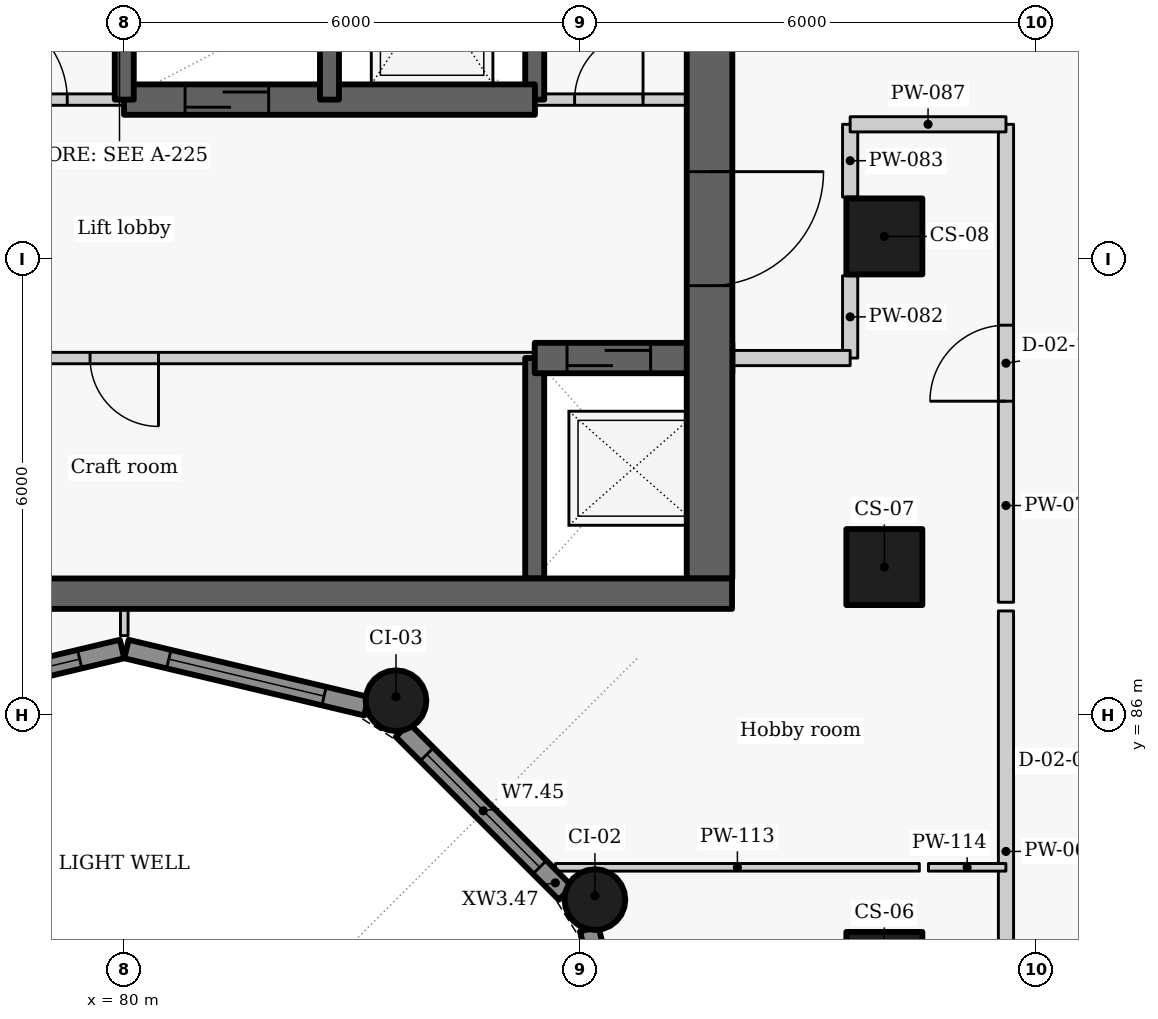
"""IFC4 building model, lengths in metres.
Left out: names, types, materials, properties, quantities, classifications, styles, units other than length and angle.
Written with IfcOpenShell. Run it as: python <this file> out.ifc"""

import sys

from ifc_helpers import new_model, si_unit, direction, frame, frame_2d, origin, origin_2d, place, context, subcontext, project, spatial, rectangle, circle, extrude, element, fill, save


model = new_model("IFC4")
c1 = context("Model", 3, precision=1e-05, world=origin(), true_north=direction((0.0, 1.0)))
c2 = subcontext(c1, "Body", "Model", "MODEL_VIEW")
j1 = project(units=[si_unit("LENGTHUNIT", "METRE"), si_unit("PLANEANGLEUNIT", "RADIAN")], contexts=[c1])
p1 = place(None, origin())
s1 = spatial("IfcSite", under=j1, at=p1, CompositionType="ELEMENT")
p2 = place(p1, origin())
s2 = spatial("IfcBuilding", under=s1, at=p2, CompositionType="ELEMENT")
p3 = place(p2, frame((0.0, 0.0, 130.5)))
s3 = spatial("IfcBuildingStorey", under=s2, at=p3, CompositionType="ELEMENT", Elevation=130.5)
for number, where, z_axis, x_axis in (
    (1, (90.0, 82.65, 0.0), (0.0, 0.0, 1.0), (0.0, 1.0, 0.0)),
    (2, (90.0, 87.95, 0.0), (0.0, 0.0, 1.0), (0.0, 1.0, 0.0)),
    (3, (90.0, 92.3, 0.0), (0.0, 0.0, 1.0), (0.0, 1.0, 0.0)),
):
    element("IfcColumn", number, at=place(p3, frame(where, z_axis=z_axis, x_axis=x_axis)), inside=s3, PredefinedType="COLUMN", context=c2, shape_type="SweptSolid", body=[
        extrude(rectangle(XDim=1.0, YDim=1.0, at=origin_2d()), origin(), (0.0, 0.0, 1.0), 3.3),
    ])
for number, where, z_axis, x_axis in (
    (4, (86.192, 83.575, 0.0), (0.0, 0.0, 1.0), (-0.5, 0.866, 0.0)),
    (5, (83.575, 86.192, 0.0), (0.0, 0.0, 1.0), (-0.866, 0.5, 0.0)),
):
    element("IfcColumn", number, at=place(p3, frame(where, z_axis=z_axis, x_axis=x_axis)), inside=s3, PredefinedType="COLUMN", context=c2, shape_type="SweptSolid", body=[
        extrude(circle(Radius=0.4, at=origin_2d()), origin(), (0.0, 0.0, 1.0), 3.3),
    ])
p4 = place(p3, frame((76.814, 86.119, 0.0), z_axis=(0.0, 0.0, 1.0), x_axis=(0.972773113459, 0.231759508395, 0.0)))
e6 = element("IfcWall", 6, at=p4, inside=s3, PredefinedType="SOLIDWALL", context=c2, shape_type="SweptSolid", body=[
    extrude(rectangle(XDim=3.246, YDim=0.25, at=frame_2d((1.623, 0.0))), origin(), (0.0, 0.0, 1.0), 2.425),
])
p5 = place(p4, frame((0.573, 0.0, 0.9)))
e7 = element("IfcOpeningElement", 7, at=p5, cuts=e6, PredefinedType="OPENING", context=c2, shape_type="SweptSolid", body=[
    extrude(rectangle(XDim=2.1, YDim=1.1, at=frame_2d((1.05, 0.55))), frame((0.0, 0.135, 0.0), z_axis=(0.0, -1.0, 0.0), x_axis=(1.0, 0.0, 0.0)), (0.0, 0.0, 1.0), 0.27),
])
p6 = place(p3, frame((80.029, 86.872, 0.0), z_axis=(0.0, 0.0, 1.0), x_axis=(0.972773113459, -0.231759508395, 0.0)))
e8 = element("IfcWall", 8, at=p6, inside=s3, PredefinedType="SOLIDWALL", context=c2, shape_type="SweptSolid", body=[
    extrude(rectangle(XDim=3.246, YDim=0.25, at=frame_2d((1.623, 0.0))), origin(), (0.0, 0.0, 1.0), 2.425),
])
p7 = place(p6, frame((0.573, 0.0, 0.9)))
e9 = element("IfcOpeningElement", 9, at=p7, cuts=e8, PredefinedType="OPENING", context=c2, shape_type="SweptSolid", body=[
    extrude(rectangle(XDim=2.1, YDim=1.1, at=frame_2d((1.05, 0.55))), frame((0.0, 0.135, 0.0), z_axis=(0.0, -1.0, 0.0), x_axis=(1.0, 0.0, 0.0)), (0.0, 0.0, 1.0), 0.27),
])
p8 = place(p3, frame((83.661, 85.806, 0.0), z_axis=(0.0, 0.0, 1.0), x_axis=(0.707106781187, -0.707106781187, 0.0)))
e10 = element("IfcWall", 10, at=p8, inside=s3, PredefinedType="SOLIDWALL", context=c2, shape_type="SweptSolid", body=[
    extrude(rectangle(XDim=3.033, YDim=0.25, at=frame_2d((1.517, 0.0))), origin(), (0.0, 0.0, 1.0), 2.425),
])
p9 = place(p8, frame((0.452, 0.0, 0.9)))
e11 = element("IfcOpeningElement", 11, at=p9, cuts=e10, PredefinedType="OPENING", context=c2, shape_type="SweptSolid", body=[
    extrude(rectangle(XDim=2.1, YDim=1.1, at=frame_2d((1.05, 0.55))), frame((0.0, 0.135, 0.0), z_axis=(0.0, -1.0, 0.0), x_axis=(1.0, 0.0, 0.0)), (0.0, 0.0, 1.0), 0.27),
])
p10 = place(p3, frame((86.117, 83.187, 0.0), z_axis=(0.0, 0.0, 1.0), x_axis=(0.247055971283, -0.969001211069, 0.0)))
e12 = element("IfcWall", 12, at=p10, inside=s3, PredefinedType="SOLIDWALL", context=c2, shape_type="SweptSolid", body=[
    extrude(rectangle(XDim=3.01, YDim=0.25, at=frame_2d((1.505, 0.0))), origin(), (0.0, 0.0, 1.0), 2.425),
])
p11 = place(p10, frame((0.441, 0.0, 0.9)))
e13 = element("IfcOpeningElement", 13, at=p11, cuts=e12, PredefinedType="OPENING", context=c2, shape_type="SweptSolid", body=[
    extrude(rectangle(XDim=2.1, YDim=1.1, at=frame_2d((1.05, 0.55))), frame((0.0, 0.135, 0.0), z_axis=(0.0, -1.0, 0.0), x_axis=(1.0, 0.0, 0.0)), (0.0, 0.0, 1.0), 0.27),
])
p12 = place(p3, frame((85.4, 90.7, 0.0), z_axis=(0.0, 0.0, 1.0), x_axis=(-1.0, 0.0, 0.0)))
e14 = element("IfcWall", 14, at=p12, inside=s3, PredefinedType="PARTITIONING", context=c2, shape_type="SweptSolid", body=[
    extrude(rectangle(XDim=13.4, YDim=0.15, at=frame_2d((6.7, 0.0))), origin(), (0.0, 0.0, 1.0), 3.025),
])
p13 = place(p12, frame((11.325, 0.0, 0.0)))
e15 = element("IfcOpeningElement", 15, at=p13, cuts=e14, PredefinedType="OPENING", context=c2, shape_type="SweptSolid", body=[
    extrude(rectangle(XDim=0.9, YDim=2.1, at=frame_2d((0.45, 1.05))), frame((0.0, 0.085, 0.0), z_axis=(0.0, -1.0, 0.0), x_axis=(1.0, 0.0, 0.0)), (0.0, 0.0, 1.0), 0.17),
])
p14 = place(p12, frame((4.95, 0.0, 0.0)))
e16 = element("IfcOpeningElement", 16, at=p14, cuts=e14, PredefinedType="OPENING", context=c2, shape_type="SweptSolid", body=[
    extrude(rectangle(XDim=0.9, YDim=2.1, at=frame_2d((0.45, 1.05))), frame((0.0, 0.085, 0.0), z_axis=(0.0, -1.0, 0.0), x_axis=(1.0, 0.0, 0.0)), (0.0, 0.0, 1.0), 0.17),
])
p15 = place(p3, frame((85.4, 87.8, -0.275), z_axis=(0.0, 0.0, 1.0), x_axis=(0.0, 1.0, 0.0)))
e17 = element("IfcWall", 17, at=p15, inside=s3, PredefinedType="SHEAR", context=c2, shape_type="SweptSolid", body=[
    extrude(rectangle(XDim=2.9, YDim=0.25, at=frame_2d((1.45, 0.0))), origin(), (0.0, 0.0, 1.0), 3.3),
])
p16 = place(p3, frame((85.4, 94.1, -0.275), z_axis=(0.0, 0.0, 1.0), x_axis=(0.0, 1.0, 0.0)))
e18 = element("IfcWall", 18, at=p16, inside=s3, PredefinedType="SHEAR", context=c2, shape_type="SweptSolid", body=[
    extrude(rectangle(XDim=2.8, YDim=0.25, at=frame_2d((1.4, 0.0))), origin(), (0.0, 0.0, 1.0), 3.3),
])
p17 = place(p3, frame((85.4, 90.7, -0.275), z_axis=(0.0, 0.0, 1.0), x_axis=(1.0, 0.0, 0.0)))
e19 = element("IfcWall", 19, at=p17, inside=s3, PredefinedType="SHEAR", context=c2, shape_type="SweptSolid", body=[
    extrude(rectangle(XDim=2.6, YDim=0.4, at=frame_2d((1.3, 0.0))), origin(), (0.0, 0.0, 1.0), 3.3),
])
p18 = place(p17, frame((0.425, 0.0, 0.275)))
e20 = element("IfcOpeningElement", 20, at=p18, cuts=e19, PredefinedType="OPENING", context=c2, shape_type="SweptSolid", body=[
    extrude(rectangle(XDim=1.1, YDim=2.1, at=frame_2d((0.55, 1.05))), frame((0.0, 0.21, 0.0), z_axis=(0.0, -1.0, 0.0), x_axis=(1.0, 0.0, 0.0)), (0.0, 0.0, 1.0), 0.42),
])
p19 = place(p3, frame((87.7, 103.4, -0.275), z_axis=(0.0, 0.0, 1.0), x_axis=(0.0, -1.0, 0.0)))
e21 = element("IfcWall", 21, at=p19, inside=s3, PredefinedType="SHEAR", context=c2, shape_type="SweptSolid", body=[
    extrude(rectangle(XDim=15.6, YDim=0.6, at=frame_2d((7.8, 0.0))), origin(), (0.0, 0.0, 1.0), 3.3),
])
p20 = place(p19, frame((10.248, 0.0, 0.275)))
e22 = element("IfcOpeningElement", 22, at=p20, cuts=e21, PredefinedType="OPENING", context=c2, shape_type="SweptSolid", body=[
    extrude(rectangle(XDim=1.5, YDim=2.1, at=frame_2d((0.75, 1.05))), frame((0.0, 0.31, 0.0), z_axis=(0.0, -1.0, 0.0), x_axis=(1.0, 0.0, 0.0)), (0.0, 0.0, 1.0), 0.62),
])
p21 = place(p3, frame((77.297, 94.1, 0.0), z_axis=(0.0, 0.0, 1.0), x_axis=(1.0, 0.0, 0.0)))
e23 = element("IfcWall", 23, at=p21, inside=s3, PredefinedType="PARTITIONING", context=c2, shape_type="SweptSolid", body=[
    extrude(rectangle(XDim=2.706, YDim=0.15, at=frame_2d((1.353, 0.0))), origin(), (0.0, 0.0, 1.0), 3.025),
])
p22 = place(p21, frame((0.753, 0.0, 0.0)))
e24 = element("IfcOpeningElement", 24, at=p22, cuts=e23, PredefinedType="OPENING", context=c2, shape_type="SweptSolid", body=[
    extrude(rectangle(XDim=1.2, YDim=2.1, at=frame_2d((0.6, 1.05))), frame((0.0, 0.085, 0.0), z_axis=(0.0, -1.0, 0.0), x_axis=(1.0, 0.0, 0.0)), (0.0, 0.0, 1.0), 0.17),
])
p23 = place(p3, frame((85.397, 94.1, 0.0), z_axis=(0.0, 0.0, 1.0), x_axis=(1.0, 0.0, 0.0)))
e25 = element("IfcWall", 25, at=p23, inside=s3, PredefinedType="PARTITIONING", context=c2, shape_type="SweptSolid", body=[
    extrude(rectangle(XDim=2.603, YDim=0.15, at=frame_2d((1.302, 0.0))), origin(), (0.0, 0.0, 1.0), 3.025),
])
p24 = place(p23, frame((0.528, 0.0, 0.0)))
e26 = element("IfcOpeningElement", 26, at=p24, cuts=e25, PredefinedType="OPENING", context=c2, shape_type="SweptSolid", body=[
    extrude(rectangle(XDim=0.9, YDim=2.1, at=frame_2d((0.45, 1.05))), frame((0.0, 0.085, 0.0), z_axis=(0.0, -1.0, 0.0), x_axis=(1.0, 0.0, 0.0)), (0.0, 0.0, 1.0), 0.17),
])
p25 = place(p3, frame((79.997, 94.1, -0.275), z_axis=(0.0, 0.0, 1.0), x_axis=(1.0, 0.0, 0.0)))
e27 = element("IfcWall", 27, at=p25, inside=s3, PredefinedType="SHEAR", context=c2, shape_type="SweptSolid", body=[
    extrude(rectangle(XDim=5.406, YDim=0.4, at=frame_2d((2.703, 0.0))), origin(), (0.0, 0.0, 1.0), 3.3),
])
p26 = place(p25, frame((0.803, 0.0, 0.275)))
e28 = element("IfcOpeningElement", 28, at=p26, cuts=e27, PredefinedType="OPENING", context=c2, shape_type="SweptSolid", body=[
    extrude(rectangle(XDim=1.1, YDim=2.1, at=frame_2d((0.55, 1.05))), frame((0.0, 0.21, 0.0), z_axis=(0.0, -1.0, 0.0), x_axis=(1.0, 0.0, 0.0)), (0.0, 0.0, 1.0), 0.42),
])
for number, where, z_axis, x_axis in (
    (29, (80.0, 94.1, -0.275), (0.0, 0.0, 1.0), (0.0, 1.0, 0.0)),
    (30, (82.7, 94.1, -0.275), (0.0, 0.0, 1.0), (0.0, 1.0, 0.0)),
):
    element("IfcWall", number, at=place(p3, frame(where, z_axis=z_axis, x_axis=x_axis)), inside=s3, PredefinedType="SHEAR", context=c2, shape_type="SweptSolid", body=[
        extrude(rectangle(XDim=2.8, YDim=0.25, at=frame_2d((1.4, 0.0))), origin(), (0.0, 0.0, 1.0), 3.3),
    ])
p27 = place(p3, frame((91.6, 76.887, 0.0), z_axis=(0.0, 0.0, 1.0), x_axis=(0.0, 1.0, 0.0)))
e31 = element("IfcWall", 31, at=p27, inside=s3, PredefinedType="PARTITIONING", context=c2, shape_type="SweptSolid", body=[
    extrude(rectangle(XDim=10.486, YDim=0.2, at=frame_2d((5.243, 0.0))), origin(), (0.0, 0.0, 1.0), 3.025),
])
p28 = place(p27, frame((3.058, 0.0, 0.0)))
e32 = element("IfcOpeningElement", 32, at=p28, cuts=e31, PredefinedType="OPENING", context=c2, shape_type="SweptSolid", body=[
    extrude(rectangle(XDim=1.0, YDim=2.1, at=frame_2d((0.5, 1.05))), frame((0.0, 0.11, 0.0), z_axis=(0.0, -1.0, 0.0), x_axis=(1.0, 0.0, 0.0)), (0.0, 0.0, 1.0), 0.22),
])
p29 = place(p3, frame((91.6, 87.487, 0.0), z_axis=(0.0, 0.0, 1.0), x_axis=(0.0, 1.0, 0.0)))
e33 = element("IfcWall", 33, at=p29, inside=s3, PredefinedType="PARTITIONING", context=c2, shape_type="SweptSolid", body=[
    extrude(rectangle(XDim=6.288, YDim=0.2, at=frame_2d((3.144, 0.0))), origin(), (0.0, 0.0, 1.0), 3.025),
])
p30 = place(p29, frame((2.645, 0.0, 0.0)))
e34 = element("IfcOpeningElement", 34, at=p30, cuts=e33, PredefinedType="OPENING", context=c2, shape_type="SweptSolid", body=[
    extrude(rectangle(XDim=1.0, YDim=2.1, at=frame_2d((0.5, 1.05))), frame((0.0, 0.11, 0.0), z_axis=(0.0, -1.0, 0.0), x_axis=(1.0, 0.0, 0.0)), (0.0, 0.0, 1.0), 0.22),
])
p31 = place(p3, frame((89.55, 90.7, 0.0), z_axis=(0.0, 0.0, 1.0), x_axis=(0.0, 1.0, 0.0)))
e35 = element("IfcWall", 35, at=p31, inside=s3, PredefinedType="PARTITIONING", context=c2, shape_type="SweptSolid", body=[
    extrude(rectangle(XDim=1.083, YDim=0.2, at=frame_2d((0.542, 0.0))), origin(), (0.0, 0.0, 1.0), 3.025),
])
p32 = place(p3, frame((89.55, 92.817, 0.0), z_axis=(0.0, 0.0, 1.0), x_axis=(0.0, 1.0, 0.0)))
e36 = element("IfcWall", 36, at=p32, inside=s3, PredefinedType="PARTITIONING", context=c2, shape_type="SweptSolid", body=[
    extrude(rectangle(XDim=0.958, YDim=0.2, at=frame_2d((0.479, 0.0))), origin(), (0.0, 0.0, 1.0), 3.025),
])
p33 = place(p3, frame((89.55, 93.775, 0.0), z_axis=(0.0, 0.0, 1.0), x_axis=(1.0, 0.0, 0.0)))
e37 = element("IfcWall", 37, at=p33, inside=s3, PredefinedType="PARTITIONING", context=c2, shape_type="SweptSolid", body=[
    extrude(rectangle(XDim=2.05, YDim=0.2, at=frame_2d((1.025, 0.0))), origin(), (0.0, 0.0, 1.0), 2.505),
])
p34 = place(p3, frame((88.0, 90.7, 0.0), z_axis=(0.0, 0.0, 1.0), x_axis=(1.0, 0.0, 0.0)))
e38 = element("IfcWall", 38, at=p34, inside=s3, PredefinedType="PARTITIONING", context=c2, shape_type="SweptSolid", body=[
    extrude(rectangle(XDim=1.55, YDim=0.2, at=frame_2d((0.775, 0.0))), origin(), (0.0, 0.0, 1.0), 3.025),
])
p35 = place(p3, frame((80.0, 87.048, 0.0), z_axis=(0.0, 0.0, 1.0), x_axis=(0.0, 1.0, 0.0)))
e39 = element("IfcWall", 39, at=p35, inside=s3, PredefinedType="PARTITIONING", context=c2, shape_type="SweptSolid", body=[
    extrude(rectangle(XDim=0.352, YDim=0.1, at=frame_2d((0.176, 0.0))), origin(), (0.0, 0.0, 1.0), 3.025),
])
p36 = place(p3, frame((85.673, 84.0, 0.0), z_axis=(0.0, 0.0, 1.0), x_axis=(1.0, 0.0, 0.0)))
e40 = element("IfcWall", 40, at=p36, inside=s3, PredefinedType="PARTITIONING", context=c2, shape_type="SweptSolid", body=[
    extrude(rectangle(XDim=4.787, YDim=0.1, at=frame_2d((2.393, 0.0))), origin(), (0.0, 0.0, 1.0), 2.505),
])
p37 = place(p3, frame((90.58, 84.0, 0.0), z_axis=(0.0, 0.0, 1.0), x_axis=(1.0, 0.0, 0.0)))
e41 = element("IfcWall", 41, at=p37, inside=s3, PredefinedType="PARTITIONING", context=c2, shape_type="SweptSolid", body=[
    extrude(rectangle(XDim=1.019, YDim=0.1, at=frame_2d((0.51, 0.0))), origin(), (0.0, 0.0, 1.0), 3.025),
])
p38 = place(p3, frame((72.004, 87.6, -0.275), z_axis=(0.0, 0.0, 1.0), x_axis=(1.0, 0.0, 0.0)))
e42 = element("IfcWall", 42, at=p38, inside=s3, PredefinedType="SHEAR", context=c2, shape_type="SweptSolid", body=[
    extrude(rectangle(XDim=15.992, YDim=0.4, at=frame_2d((7.996, 0.0))), origin(), (0.0, 0.0, 1.0), 3.3),
])
p39 = place(p5, origin())
e43 = element("IfcWindow", 43, at=p39, inside=s3, PartitioningType="SINGLE_PANEL", PredefinedType="WINDOW", context=c2, shape_type="SweptSolid", body=[
    extrude(rectangle(XDim=2.1, YDim=1.1, at=frame_2d((1.05, 0.55))), frame((0.0, 0.03, 0.0), z_axis=(0.0, -1.0, 0.0), x_axis=(1.0, 0.0, 0.0)), (0.0, 0.0, 1.0), 0.06),
])
fill(e7, e43)
p40 = place(p7, origin())
e44 = element("IfcWindow", 44, at=p40, inside=s3, PartitioningType="SINGLE_PANEL", PredefinedType="WINDOW", context=c2, shape_type="SweptSolid", body=[
    extrude(rectangle(XDim=2.1, YDim=1.1, at=frame_2d((1.05, 0.55))), frame((0.0, 0.03, 0.0), z_axis=(0.0, -1.0, 0.0), x_axis=(1.0, 0.0, 0.0)), (0.0, 0.0, 1.0), 0.06),
])
fill(e9, e44)
p41 = place(p9, origin())
e45 = element("IfcWindow", 45, at=p41, inside=s3, PartitioningType="SINGLE_PANEL", PredefinedType="WINDOW", context=c2, shape_type="SweptSolid", body=[
    extrude(rectangle(XDim=2.1, YDim=1.1, at=frame_2d((1.05, 0.55))), frame((0.0, 0.03, 0.0), z_axis=(0.0, -1.0, 0.0), x_axis=(1.0, 0.0, 0.0)), (0.0, 0.0, 1.0), 0.06),
])
fill(e11, e45)
p42 = place(p18, origin())
e46 = element("IfcDoor", 46, at=p42, inside=s3, OperationType="SLIDING_TO_LEFT", PredefinedType="DOOR", context=c2, shape_type="SweptSolid", body=[
    extrude(rectangle(XDim=1.1, YDim=2.1, at=frame_2d((0.55, 1.05))), frame((0.0, 0.025, 0.0), z_axis=(0.0, -1.0, 0.0), x_axis=(1.0, 0.0, 0.0)), (0.0, 0.0, 1.0), 0.05),
])
fill(e20, e46)
p43 = place(p14, origin())
e47 = element("IfcDoor", 47, at=p43, inside=s3, OperationType="SINGLE_SWING_LEFT", PredefinedType="DOOR", context=c2, shape_type="SweptSolid", body=[
    extrude(rectangle(XDim=0.9, YDim=2.1, at=frame_2d((0.45, 1.05))), frame((0.0, 0.025, 0.0), z_axis=(0.0, -1.0, 0.0), x_axis=(1.0, 0.0, 0.0)), (0.0, 0.0, 1.0), 0.05),
])
fill(e16, e47)
p44 = place(p22, origin())
e48 = element("IfcDoor", 48, at=p44, inside=s3, OperationType="DOUBLE_DOOR_SINGLE_SWING", PredefinedType="DOOR", context=c2, shape_type="SweptSolid", body=[
    extrude(rectangle(XDim=1.2, YDim=2.1, at=frame_2d((0.6, 1.05))), frame((0.0, 0.025, 0.0), z_axis=(0.0, -1.0, 0.0), x_axis=(1.0, 0.0, 0.0)), (0.0, 0.0, 1.0), 0.05),
])
fill(e24, e48)
p45 = place(p26, origin())
e49 = element("IfcDoor", 49, at=p45, inside=s3, OperationType="SLIDING_TO_LEFT", PredefinedType="DOOR", context=c2, shape_type="SweptSolid", body=[
    extrude(rectangle(XDim=1.1, YDim=2.1, at=frame_2d((0.55, 1.05))), frame((0.0, 0.025, 0.0), z_axis=(0.0, -1.0, 0.0), x_axis=(1.0, 0.0, 0.0)), (0.0, 0.0, 1.0), 0.05),
])
fill(e28, e49)
p46 = place(p24, origin())
e50 = element("IfcDoor", 50, at=p46, inside=s3, OperationType="SINGLE_SWING_RIGHT", PredefinedType="DOOR", context=c2, shape_type="SweptSolid", body=[
    extrude(rectangle(XDim=0.9, YDim=2.1, at=frame_2d((0.45, 1.05))), frame((0.0, 0.025, 0.0), z_axis=(0.0, -1.0, 0.0), x_axis=(1.0, 0.0, 0.0)), (0.0, 0.0, 1.0), 0.05),
])
fill(e26, e50)
p47 = place(p30, origin())
e51 = element("IfcDoor", 51, at=p47, inside=s3, OperationType="SINGLE_SWING_LEFT", PredefinedType="DOOR", context=c2, shape_type="SweptSolid", body=[
    extrude(rectangle(XDim=1.0, YDim=2.1, at=frame_2d((0.5, 1.05))), frame((0.0, 0.025, 0.0), z_axis=(0.0, -1.0, 0.0), x_axis=(1.0, 0.0, 0.0)), (0.0, 0.0, 1.0), 0.05),
])
fill(e34, e51)
p48 = place(p20, origin())
e52 = element("IfcDoor", 52, at=p48, inside=s3, OperationType="DOUBLE_DOOR_SINGLE_SWING", PredefinedType="DOOR", context=c2, shape_type="SweptSolid", body=[
    extrude(rectangle(XDim=1.5, YDim=2.1, at=frame_2d((0.75, 1.05))), frame((0.0, 0.025, 0.0), z_axis=(0.0, -1.0, 0.0), x_axis=(1.0, 0.0, 0.0)), (0.0, 0.0, 1.0), 0.05),
])
fill(e22, e52)
save(model, sys.argv[1])
